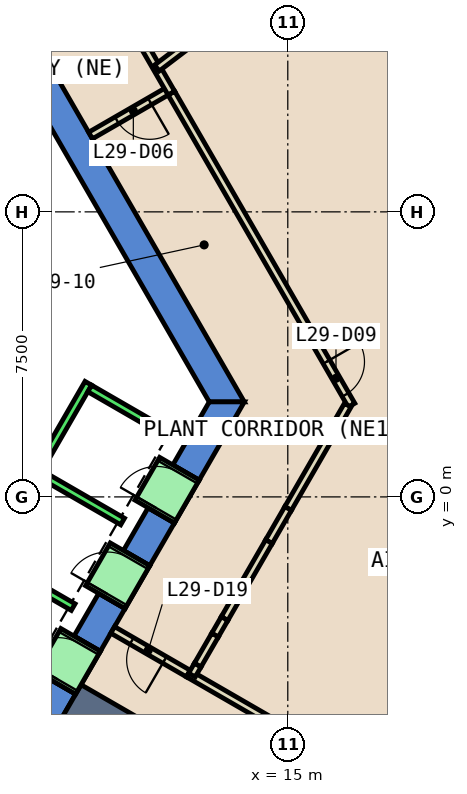
"""IFC4 building model, lengths in metres.
Left out: names, types, materials, properties, quantities, classifications, styles, units other than length and angle.
Written with IfcOpenShell. Run it as: python <this file> out.ifc"""

import sys

from ifc_helpers import new_model, si_unit, direction, frame, frame_2d, origin, place, context, subcontext, project, spatial, polyline, rectangle, outline, extrude, element, fill, save


model = new_model("IFC4")
c1 = context("Model", 3, precision=1e-05, world=origin(), true_north=direction((0.0, 1.0)))
c2 = subcontext(c1, "Body", "Model", "MODEL_VIEW")
j1 = project(units=[si_unit("LENGTHUNIT", "METRE"), si_unit("PLANEANGLEUNIT", "RADIAN")], contexts=[c1])
p1 = place(None, origin())
s1 = spatial("IfcSite", under=j1, at=p1, CompositionType="ELEMENT")
p2 = place(p1, origin())
s2 = spatial("IfcBuilding", under=s1, at=p2, CompositionType="ELEMENT")
p3 = place(p2, frame((0.0, 0.0, 132.8)))
s3 = spatial("IfcBuildingStorey", under=s2, at=p3, CompositionType="ELEMENT", Elevation=132.8)
p4 = place(p3, frame((0.0, 0.0, -0.6)))
e1 = element("IfcWall", 1, at=p4, inside=s3, PredefinedType="SHEAR", context=c2, shape_type="SweptSolid", body=[
    extrude(outline(polyline([(8.517, 11.747), (7.824, 11.347), (12.933, 2.5), (13.856, 2.5), (8.517, 11.747)])), origin(), (0.0, 0.0, 1.0), 5.4),
])
p5 = place(p3, frame((0.0, 0.0, -0.6)))
e2 = element("IfcWall", 2, at=p5, inside=s3, PredefinedType="SHEAR", context=c2, shape_type="SweptSolid", body=[
    extrude(outline(polyline([(9.417, -5.189), (8.724, -4.789), (8.075, -5.914), (8.767, -6.314), (9.417, -5.189)])), origin(), (0.0, 0.0, 1.0), 5.4),
])
p6 = place(p3, frame((0.0, 0.0, -0.6)))
e3 = element("IfcWall", 3, at=p6, inside=s3, PredefinedType="SHEAR", context=c2, shape_type="SweptSolid", body=[
    extrude(outline(polyline([(10.717, -2.937), (10.025, -2.537), (9.374, -3.663), (10.067, -4.063), (10.717, -2.937)])), origin(), (0.0, 0.0, 1.0), 5.4),
])
p7 = place(p3, frame((0.0, 0.0, -0.6)))
e4 = element("IfcWall", 4, at=p7, inside=s3, PredefinedType="SHEAR", context=c2, shape_type="SweptSolid", body=[
    extrude(outline(polyline([(12.017, -0.686), (11.324, -0.286), (10.675, -1.411), (11.367, -1.811), (12.017, -0.686)])), origin(), (0.0, 0.0, 1.0), 5.4),
])
p8 = place(p3, frame((0.0, 0.0, -0.6)))
e5 = element("IfcWall", 5, at=p8, inside=s3, PredefinedType="SHEAR", context=c2, shape_type="SweptSolid", body=[
    extrude(outline(polyline([(11.974, 0.84), (12.667, 0.44), (13.856, 2.5), (12.933, 2.5), (11.974, 0.84)])), origin(), (0.0, 0.0, 1.0), 5.4),
])
p9 = place(p3, frame((0.0, 0.0, 3.6)))
e6 = element("IfcWall", 6, at=p9, inside=s3, PredefinedType="SHEAR", context=c2, shape_type="SweptSolid", body=[
    extrude(outline(polyline([(10.067, -4.063), (9.374, -3.663), (8.724, -4.789), (9.417, -5.189), (10.067, -4.063)])), origin(), (0.0, 0.0, 1.0), 1.2),
])
p10 = place(p3, frame((0.0, 0.0, 3.6)))
e7 = element("IfcWall", 7, at=p10, inside=s3, PredefinedType="SHEAR", context=c2, shape_type="SweptSolid", body=[
    extrude(outline(polyline([(11.367, -1.811), (10.675, -1.411), (10.025, -2.537), (10.717, -2.937), (11.367, -1.811)])), origin(), (0.0, 0.0, 1.0), 1.2),
])
p11 = place(p3, frame((0.0, 0.0, 3.6)))
e8 = element("IfcWall", 8, at=p11, inside=s3, PredefinedType="SHEAR", context=c2, shape_type="SweptSolid", body=[
    extrude(outline(polyline([(12.667, 0.44), (11.974, 0.84), (11.324, -0.286), (12.017, -0.686), (12.667, 0.44)])), origin(), (0.0, 0.0, 1.0), 1.2),
])
p12 = place(p3, frame((9.31, -5.375, 0.0), z_axis=(0.0, 0.0, 1.0), x_axis=(0.86602173752, -0.500006350103, 0.0)))
e9 = element("IfcWall", 9, at=p12, inside=s3, PredefinedType="SHEAR", context=c2, shape_type="SweptSolid", body=[
    extrude(rectangle(XDim=31.463, YDim=1.0, at=frame_2d((15.732, 0.0))), origin(), (0.0, 0.0, 1.0), 4.8),
])
p13 = place(p3, frame((12.384, -4.65, 0.0), z_axis=(0.0, 0.0, 1.0), x_axis=(-0.866053019151, 0.499952165731, 0.0)))
e10 = element("IfcWall", 10, at=p13, inside=s3, PredefinedType="PARTITIONING", context=c2, shape_type="SweptSolid", body=[
    extrude(rectangle(XDim=2.3, YDim=0.2, at=frame_2d((1.15, 0.0))), origin(), (0.0, 0.0, 1.0), 4.8),
])
p14 = place(p13, frame((0.721, 0.0, 0.0)))
e11 = element("IfcOpeningElement", 11, at=p14, cuts=e10, PredefinedType="OPENING", context=c2, shape_type="SweptSolid", body=[
    extrude(rectangle(XDim=1.0, YDim=2.1, at=frame_2d((0.5, 1.05))), frame((0.0, 0.11, 0.0), z_axis=(0.0, -1.0, 0.0), x_axis=(1.0, 0.0, 0.0)), (0.0, 0.0, 1.0), 0.22),
])
p15 = place(p3, frame((12.384, -4.65, 0.0), z_axis=(0.0, 0.0, 1.0), x_axis=(0.866033509011, -0.499985961072, 0.0)))
e12 = element("IfcWall", 12, at=p15, inside=s3, PredefinedType="PARTITIONING", context=c2, shape_type="SweptSolid", body=[
    extrude(rectangle(XDim=29.487, YDim=0.2, at=frame_2d((14.744, 0.0))), origin(), (0.0, 0.0, 1.0), 4.8),
])
p16 = place(p3, frame((11.888, 10.709, 0.0), z_axis=(0.0, 0.0, 1.0), x_axis=(-0.865973769406, -0.500089422704, 0.0)))
e13 = element("IfcWall", 13, at=p16, inside=s3, PredefinedType="PARTITIONING", context=c2, shape_type="SweptSolid", body=[
    extrude(rectangle(XDim=2.399, YDim=0.2, at=frame_2d((1.2, 0.0))), origin(), (0.0, 0.0, 1.0), 2.4),
])
p17 = place(p16, frame((0.6, 0.0, 0.0)))
e14 = element("IfcOpeningElement", 14, at=p17, cuts=e13, PredefinedType="OPENING", context=c2, shape_type="SweptSolid", body=[
    extrude(rectangle(XDim=1.0, YDim=2.1, at=frame_2d((0.5, 1.05))), frame((0.0, 0.11, 0.0), z_axis=(0.0, -1.0, 0.0), x_axis=(1.0, 0.0, 0.0)), (0.0, 0.0, 1.0), 0.22),
])
p18 = place(p3, frame((8.338, 16.858, 0.0), z_axis=(0.0, 0.0, 1.0), x_axis=(0.499982693035, -0.866035395735, 0.0)))
e15 = element("IfcWall", 15, at=p18, inside=s3, PredefinedType="PARTITIONING", context=c2, shape_type="SweptSolid", body=[
    extrude(rectangle(XDim=7.2, YDim=0.2, at=frame_2d((3.6, 0.0))), origin(), (0.0, 0.0, 1.0), 4.8),
])
p19 = place(p18, frame((2.655, 0.0, 0.0)))
e16 = element("IfcOpeningElement", 16, at=p19, cuts=e15, PredefinedType="OPENING", context=c2, shape_type="SweptSolid", body=[
    extrude(rectangle(XDim=1.0, YDim=2.1, at=frame_2d((0.5, 1.05))), frame((0.0, 0.11, 0.0), z_axis=(0.0, -1.0, 0.0), x_axis=(1.0, 0.0, 0.0)), (0.0, 0.0, 1.0), 0.22),
])
p20 = place(p3, frame((11.938, 10.622, 0.0), z_axis=(0.0, 0.0, 1.0), x_axis=(0.499964736285, -0.866045762343, 0.0)))
e17 = element("IfcWall", 17, at=p20, inside=s3, PredefinedType="PARTITIONING", context=c2, shape_type="SweptSolid", body=[
    extrude(rectangle(XDim=9.479, YDim=0.2, at=frame_2d((4.739, 0.0))), origin(), (0.0, 0.0, 1.0), 4.8),
])
p21 = place(p20, frame((8.161, 0.0, 0.0)))
e18 = element("IfcOpeningElement", 18, at=p21, cuts=e17, PredefinedType="OPENING", context=c2, shape_type="SweptSolid", body=[
    extrude(rectangle(XDim=1.0, YDim=2.1, at=frame_2d((0.5, 1.05))), frame((0.0, 0.11, 0.0), z_axis=(0.0, -1.0, 0.0), x_axis=(1.0, 0.0, 0.0)), (0.0, 0.0, 1.0), 0.22),
])
p22 = place(p3, frame((16.577, 2.413, 0.0), z_axis=(0.0, 0.0, 1.0), x_axis=(-0.499491199364, -0.866318960751, 0.0)))
e19 = element("IfcWall", 19, at=p22, inside=s3, PredefinedType="PARTITIONING", context=c2, shape_type="SweptSolid", body=[
    extrude(rectangle(XDim=0.548, YDim=0.2, at=frame_2d((0.274, 0.0))), origin(), (0.0, 0.0, 1.0), 2.4),
])
p23 = place(p3, frame((16.303, 1.938, 0.0), z_axis=(0.0, 0.0, 1.0), x_axis=(-0.499991733496, -0.8660301764, 0.0)))
e20 = element("IfcWall", 20, at=p23, inside=s3, PredefinedType="PARTITIONING", context=c2, shape_type="SweptSolid", body=[
    extrude(rectangle(XDim=2.59, YDim=0.2, at=frame_2d((1.295, 0.0))), origin(), (0.0, 0.0, 1.0), 4.8),
])
p24 = place(p3, frame((15.008, -0.305, 0.0), z_axis=(0.0, 0.0, 1.0), x_axis=(-0.500071819257, -0.865983934946, 0.0)))
e21 = element("IfcWall", 21, at=p24, inside=s3, PredefinedType="PARTITIONING", context=c2, shape_type="SweptSolid", body=[
    extrude(rectangle(XDim=1.008, YDim=0.2, at=frame_2d((0.504, 0.0))), origin(), (0.0, 0.0, 1.0), 2.4),
])
p25 = place(p3, frame((14.504, -1.178, 0.0), z_axis=(0.0, 0.0, 1.0), x_axis=(-0.499994945868, -0.866028321769, 0.0)))
e22 = element("IfcWall", 22, at=p25, inside=s3, PredefinedType="PARTITIONING", context=c2, shape_type="SweptSolid", body=[
    extrude(rectangle(XDim=1.396, YDim=0.2, at=frame_2d((0.698, 0.0))), origin(), (0.0, 0.0, 1.0), 4.8),
])
p26 = place(p3, frame((13.806, -2.387, 0.0), z_axis=(0.0, 0.0, 1.0), x_axis=(-0.499572668549, -0.866271983178, 0.0)))
e23 = element("IfcWall", 23, at=p26, inside=s3, PredefinedType="PARTITIONING", context=c2, shape_type="SweptSolid", body=[
    extrude(rectangle(XDim=0.941, YDim=0.2, at=frame_2d((0.47, 0.0))), origin(), (0.0, 0.0, 1.0), 2.4),
])
p27 = place(p3, frame((13.336, -3.202, 0.0), z_axis=(0.0, 0.0, 1.0), x_axis=(-0.499694399542, -0.866201770413, 0.0)))
e24 = element("IfcWall", 24, at=p27, inside=s3, PredefinedType="PARTITIONING", context=c2, shape_type="SweptSolid", body=[
    extrude(rectangle(XDim=0.502, YDim=0.2, at=frame_2d((0.251, 0.0))), origin(), (0.0, 0.0, 1.0), 4.8),
])
p28 = place(p3, frame((13.085, -3.637, 0.0), z_axis=(0.0, 0.0, 1.0), x_axis=(-0.500402557727, -0.865792862191, 0.0)))
e25 = element("IfcWall", 25, at=p28, inside=s3, PredefinedType="PARTITIONING", context=c2, shape_type="SweptSolid", body=[
    extrude(rectangle(XDim=0.911, YDim=0.2, at=frame_2d((0.456, 0.0))), origin(), (0.0, 0.0, 1.0), 2.1),
])
p29 = place(p3, frame((12.629, -4.426, 0.0), z_axis=(0.0, 0.0, 1.0), x_axis=(-0.500493465029, -0.865740314103, 0.0)))
e26 = element("IfcWall", 26, at=p29, inside=s3, PredefinedType="PARTITIONING", context=c2, shape_type="SweptSolid", body=[
    extrude(rectangle(XDim=0.302, YDim=0.2, at=frame_2d((0.151, 0.0))), origin(), (0.0, 0.0, 1.0), 4.8),
])
p30 = place(p3, frame((20.432, 18.032, 0.0), z_axis=(0.0, 0.0, 1.0), x_axis=(-0.796104804042, -0.605158773366, 0.0)))
e27 = element("IfcWall", 27, at=p30, inside=s3, PredefinedType="PARTITIONING", context=c2, shape_type="SweptSolid", body=[
    extrude(rectangle(XDim=11.149, YDim=0.2, at=frame_2d((5.575, 0.0))), origin(), (0.0, 0.0, 1.0), 4.8),
])
p31 = place(p3, frame((4.451, -6.19, 0.0), z_axis=(0.0, 0.0, 1.0), x_axis=(0.50000090737, 0.866024879913, 0.0)))
e28 = element("IfcWall", 28, at=p31, inside=s3, PredefinedType="STANDARD", context=c2, shape_type="SweptSolid", body=[
    extrude(rectangle(XDim=10.6, YDim=0.2, at=frame_2d((5.3, 0.0))), origin(), (0.0, 0.0, 1.0), 4.8),
])
for number, where, z_axis, x_axis in (
    (29, (7.188, -1.65, 0.0), (0.0, 0.0, 1.0), (0.866, -0.5, 0.0)),
    (30, (8.488, 0.602, 0.0), (0.0, 0.0, 1.0), (0.866, -0.5, 0.0)),
):
    element("IfcWall", number, at=place(p3, frame(where, z_axis=z_axis, x_axis=x_axis)), inside=s3, PredefinedType="STANDARD", context=c2, shape_type="SweptSolid", body=[
        extrude(rectangle(XDim=2.5, YDim=0.2, at=frame_2d((1.25, 0.0))), origin(), (0.0, 0.0, 1.0), 4.8),
    ])
p32 = place(p3, frame((9.788, 2.853, 0.0), z_axis=(0.0, 0.0, 1.0), x_axis=(0.865998541277, -0.500046524342, 0.0)))
e31 = element("IfcWall", 31, at=p32, inside=s3, PredefinedType="STANDARD", context=c2, shape_type="SweptSolid", body=[
    extrude(rectangle(XDim=2.5, YDim=0.2, at=frame_2d((1.25, 0.0))), origin(), (0.0, 0.0, 1.0), 4.8),
])
p33 = place(p3, frame((8.898, -4.889, 0.0), z_axis=(0.0, 0.0, 1.0), x_axis=(0.500036693733, 0.866004217611, 0.0)))
e32 = element("IfcWall", 32, at=p33, inside=s3, PredefinedType="STANDARD", context=c2, shape_type="SweptSolid", body=[
    extrude(rectangle(XDim=1.3, YDim=1.2, at=frame_2d((0.65, 0.0))), origin(), (0.0, 0.0, 1.0), 2.4),
])
p34 = place(p33, frame((0.1, 0.0, 0.0)))
e33 = element("IfcOpeningElement", 33, at=p34, cuts=e32, PredefinedType="OPENING", context=c2, shape_type="SweptSolid", body=[
    extrude(rectangle(XDim=1.1, YDim=2.3, at=frame_2d((0.55, 1.15))), frame((0.0, 0.61, 0.0), z_axis=(0.0, -1.0, 0.0), x_axis=(1.0, 0.0, 0.0)), (0.0, 0.0, 1.0), 1.22),
])
p35 = place(p3, frame((10.198, -2.637, 0.0), z_axis=(0.0, 0.0, 1.0), x_axis=(0.49989585183, 0.866085525409, 0.0)))
e34 = element("IfcWall", 34, at=p35, inside=s3, PredefinedType="STANDARD", context=c2, shape_type="SweptSolid", body=[
    extrude(rectangle(XDim=1.3, YDim=1.2, at=frame_2d((0.65, 0.0))), origin(), (0.0, 0.0, 1.0), 2.4),
])
p36 = place(p35, frame((0.1, 0.0, 0.0)))
e35 = element("IfcOpeningElement", 35, at=p36, cuts=e34, PredefinedType="OPENING", context=c2, shape_type="SweptSolid", body=[
    extrude(rectangle(XDim=1.1, YDim=2.3, at=frame_2d((0.55, 1.15))), frame((0.0, 0.61, 0.0), z_axis=(0.0, -1.0, 0.0), x_axis=(1.0, 0.0, 0.0)), (0.0, 0.0, 1.0), 1.22),
])
p37 = place(p3, frame((11.498, -0.385, 0.0), z_axis=(0.0, 0.0, 1.0), x_axis=(0.500221244143, 0.865897630733, 0.0)))
e36 = element("IfcWall", 36, at=p37, inside=s3, PredefinedType="STANDARD", context=c2, shape_type="SweptSolid", body=[
    extrude(rectangle(XDim=1.299, YDim=1.2, at=frame_2d((0.65, 0.0))), origin(), (0.0, 0.0, 1.0), 2.4),
])
p38 = place(p37, frame((0.1, 0.0, 0.0)))
e37 = element("IfcOpeningElement", 37, at=p38, cuts=e36, PredefinedType="OPENING", context=c2, shape_type="SweptSolid", body=[
    extrude(rectangle(XDim=1.1, YDim=2.3, at=frame_2d((0.55, 1.15))), frame((0.0, 0.61, 0.0), z_axis=(0.0, -1.0, 0.0), x_axis=(1.0, 0.0, 0.0)), (0.0, 0.0, 1.0), 1.22),
])
p39 = place(p17, origin())
e38 = element("IfcDoor", 38, at=p39, inside=s3, OperationType="SINGLE_SWING_RIGHT", PredefinedType="DOOR", context=c2, shape_type="SweptSolid", body=[
    extrude(rectangle(XDim=1.0, YDim=2.1, at=frame_2d((0.5, 1.05))), frame((0.0, 0.025, 0.0), z_axis=(0.0, -1.0, 0.0), x_axis=(1.0, 0.0, 0.0)), (0.0, 0.0, 1.0), 0.05),
])
fill(e14, e38)
p40 = place(p21, origin())
e39 = element("IfcDoor", 39, at=p40, inside=s3, OperationType="SINGLE_SWING_LEFT", PredefinedType="DOOR", context=c2, shape_type="SweptSolid", body=[
    extrude(rectangle(XDim=1.0, YDim=2.1, at=frame_2d((0.5, 1.05))), frame((0.0, 0.025, 0.0), z_axis=(0.0, -1.0, 0.0), x_axis=(1.0, 0.0, 0.0)), (0.0, 0.0, 1.0), 0.05),
])
fill(e18, e39)
p41 = place(p14, origin())
e40 = element("IfcDoor", 40, at=p41, inside=s3, OperationType="SINGLE_SWING_LEFT", PredefinedType="DOOR", context=c2, shape_type="SweptSolid", body=[
    extrude(rectangle(XDim=1.0, YDim=2.1, at=frame_2d((0.5, 1.05))), frame((0.0, 0.025, 0.0), z_axis=(0.0, -1.0, 0.0), x_axis=(1.0, 0.0, 0.0)), (0.0, 0.0, 1.0), 0.05),
])
fill(e11, e40)
p42 = place(p34, origin())
e41 = element("IfcDoor", 41, at=p42, inside=s3, OperationType="SLIDING_TO_LEFT", PredefinedType="DOOR", context=c2, shape_type="SweptSolid", body=[
    extrude(rectangle(XDim=1.1, YDim=2.3, at=frame_2d((0.55, 1.15))), frame((0.0, 0.025, 0.0), z_axis=(0.0, -1.0, 0.0), x_axis=(1.0, 0.0, 0.0)), (0.0, 0.0, 1.0), 0.05),
])
fill(e33, e41)
p43 = place(p36, origin())
e42 = element("IfcDoor", 42, at=p43, inside=s3, OperationType="SLIDING_TO_LEFT", PredefinedType="DOOR", context=c2, shape_type="SweptSolid", body=[
    extrude(rectangle(XDim=1.1, YDim=2.3, at=frame_2d((0.55, 1.15))), frame((0.0, 0.025, 0.0), z_axis=(0.0, -1.0, 0.0), x_axis=(1.0, 0.0, 0.0)), (0.0, 0.0, 1.0), 0.05),
])
fill(e35, e42)
p44 = place(p38, origin())
e43 = element("IfcDoor", 43, at=p44, inside=s3, OperationType="SLIDING_TO_LEFT", PredefinedType="DOOR", context=c2, shape_type="SweptSolid", body=[
    extrude(rectangle(XDim=1.1, YDim=2.3, at=frame_2d((0.55, 1.15))), frame((0.0, 0.025, 0.0), z_axis=(0.0, -1.0, 0.0), x_axis=(1.0, 0.0, 0.0)), (0.0, 0.0, 1.0), 0.05),
])
fill(e37, e43)
save(model, sys.argv[1])
